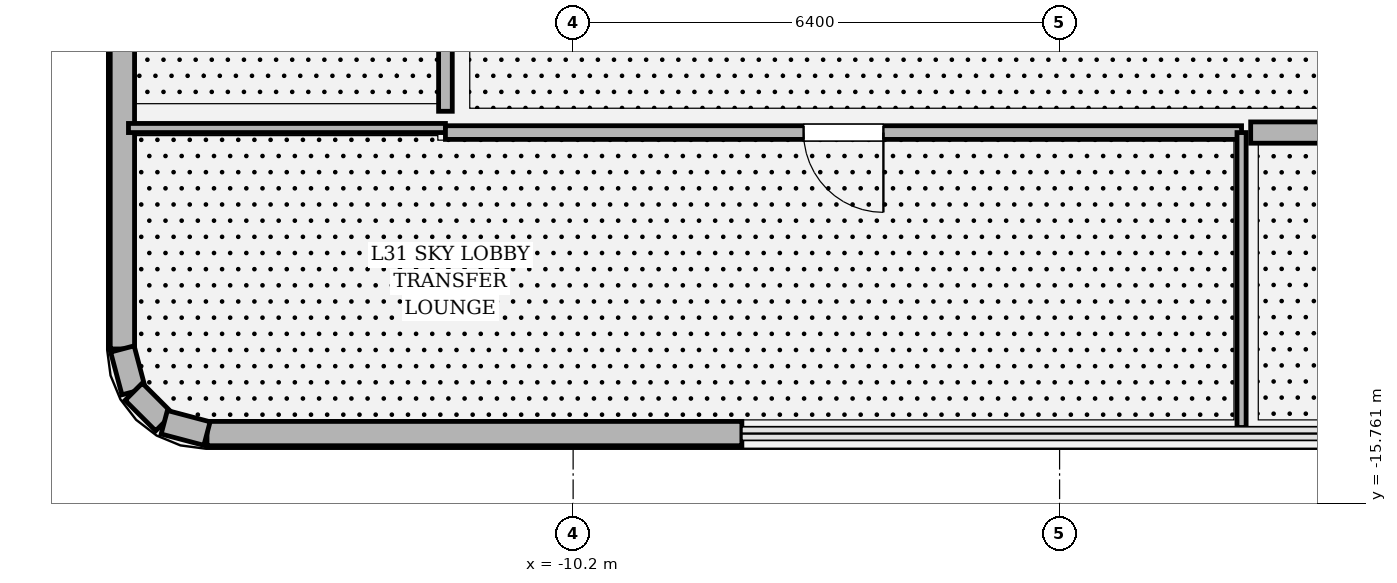
"""IFC4 building model, lengths in metres.
Left out: names, types, materials, properties, quantities, classifications, styles, units other than length and angle.
Written with IfcOpenShell. Run it as: python <this file> out.ifc"""

import sys

from ifc_helpers import new_model, si_unit, direction, frame, frame_2d, origin, place, context, subcontext, project, spatial, rectangle, extrude, element, fill, save


model = new_model("IFC4")
c1 = context("Model", 3, precision=1e-05, world=origin(), true_north=direction((0.0, 1.0)))
c2 = subcontext(c1, "Body", "Model", "MODEL_VIEW")
j1 = project(units=[si_unit("LENGTHUNIT", "METRE"), si_unit("PLANEANGLEUNIT", "RADIAN")], contexts=[c1])
p1 = place(None, origin())
s1 = spatial("IfcSite", under=j1, at=p1, CompositionType="ELEMENT")
p2 = place(p1, origin())
s2 = spatial("IfcBuilding", under=s1, at=p2, CompositionType="ELEMENT")
p3 = place(p2, frame((0.0, 0.0, 135.0)))
s3 = spatial("IfcBuildingStorey", under=s2, at=p3, CompositionType="ELEMENT", Elevation=135.0)
for number, where, z_axis, x_axis in (
    (1, (-15.017, -14.84, 0.0), (0.0, 0.0, 1.0), (1.0, 0.0, 0.0)),
    (2, (-16.13, -6.69, 0.0), (0.0, 0.0, 1.0), (0.0, -1.0, 0.0)),
):
    element("IfcWall", number, at=place(p3, frame(where, z_axis=z_axis, x_axis=x_axis)), inside=s3, PredefinedType="SOLIDWALL", context=c2, shape_type="SweptSolid", body=[
        extrude(rectangle(XDim=7.037, YDim=0.32, at=frame_2d((3.519, 0.0))), origin(), (0.0, 0.0, 1.0), 3.194),
    ])
p4 = place(p3, frame((-16.13, -13.727, 0.0), z_axis=(0.0, 0.0, 1.0), x_axis=(0.255650250031, -0.966769336325, 0.0)))
e3 = element("IfcWall", 3, at=p4, inside=s3, PredefinedType="SOLIDWALL", context=c2, shape_type="SweptSolid", body=[
    extrude(rectangle(XDim=0.582, YDim=0.32, at=frame_2d((0.291, 0.0))), origin(), (0.0, 0.0, 1.0), 4.52),
])
p5 = place(p3, frame((-15.981, -14.289, 0.0), z_axis=(0.0, 0.0, 1.0), x_axis=(0.707106781187, -0.707106781187, 0.0)))
e4 = element("IfcWall", 4, at=p5, inside=s3, PredefinedType="SOLIDWALL", context=c2, shape_type="SweptSolid", body=[
    extrude(rectangle(XDim=0.569, YDim=0.32, at=frame_2d((0.284, 0.0))), origin(), (0.0, 0.0, 1.0), 4.52),
])
p6 = place(p3, frame((-15.579, -14.691, 0.0), z_axis=(0.0, 0.0, 1.0), x_axis=(0.966665515501, -0.256042537758, 0.0)))
e5 = element("IfcWall", 5, at=p6, inside=s3, PredefinedType="SOLIDWALL", context=c2, shape_type="SweptSolid", body=[
    extrude(rectangle(XDim=0.582, YDim=0.32, at=frame_2d((0.291, 0.0))), origin(), (0.0, 0.0, 1.0), 4.52),
])
p7 = place(p3, frame((-16.05, -10.82, 0.0), z_axis=(0.0, 0.0, 1.0), x_axis=(1.0, 0.0, 0.0)))
e6 = element("IfcWall", 6, at=p7, inside=s3, PredefinedType="PARTITIONING", context=c2, shape_type="SweptSolid", body=[
    extrude(rectangle(XDim=4.17, YDim=0.12, at=frame_2d((2.085, 0.0))), origin(), (0.0, 0.0, 1.0), 4.114),
])
p8 = place(p3, frame((-11.88, -10.88, 0.0), z_axis=(0.0, 0.0, 1.0), x_axis=(1.0, 0.0, 0.0)))
e7 = element("IfcWall", 7, at=p8, inside=s3, PredefinedType="PARTITIONING", context=c2, shape_type="SweptSolid", body=[
    extrude(rectangle(XDim=10.474, YDim=0.18, at=frame_2d((5.237, 0.0))), origin(), (0.0, 0.0, 1.0), 3.194),
])
p9 = place(p8, frame((4.712, 0.0, 0.0)))
e8 = element("IfcOpeningElement", 8, at=p9, cuts=e7, PredefinedType="OPENING", context=c2, shape_type="SweptSolid", body=[
    extrude(rectangle(XDim=1.05, YDim=2.2, at=frame_2d((0.525, 1.1))), frame((0.0, 0.1, 0.0), z_axis=(0.0, -1.0, 0.0), x_axis=(1.0, 0.0, 0.0)), (0.0, 0.0, 1.0), 0.2),
])
p10 = place(p3, frame((-1.406, -10.88, 0.0), z_axis=(0.0, 0.0, 1.0), x_axis=(0.0, -1.0, 0.0)))
e9 = element("IfcWall", 9, at=p10, inside=s3, PredefinedType="PARTITIONING", context=c2, shape_type="SweptSolid", body=[
    extrude(rectangle(XDim=3.88, YDim=0.12, at=frame_2d((1.94, 0.0))), origin(), (0.0, 0.0, 1.0), 4.52),
])
p11 = place(p3, frame((-1.286, -10.88, 0.0), z_axis=(0.0, 0.0, 1.0), x_axis=(1.0, 0.0, 0.0)))
e10 = element("IfcWall", 10, at=p11, inside=s3, PredefinedType="SOLIDWALL", context=c2, shape_type="SweptSolid", body=[
    extrude(rectangle(XDim=13.166, YDim=0.28, at=frame_2d((6.583, 0.0))), origin(), (0.0, 0.0, 1.0), 3.194),
])
p12 = place(p11, frame((5.733, 0.0, 0.0)))
e11 = element("IfcOpeningElement", 11, at=p12, cuts=e10, PredefinedType="OPENING", context=c2, shape_type="SweptSolid", body=[
    extrude(rectangle(XDim=1.7, YDim=2.3, at=frame_2d((0.85, 1.15))), frame((0.0, 0.15, 0.0), z_axis=(0.0, -1.0, 0.0), x_axis=(1.0, 0.0, 0.0)), (0.0, 0.0, 1.0), 0.3),
])
p13 = place(p3, frame((-11.88, -0.06, 0.0), z_axis=(0.0, 0.0, 1.0), x_axis=(0.0, -1.0, 0.0)))
e12 = element("IfcWall", 12, at=p13, inside=s3, PredefinedType="PARTITIONING", context=c2, shape_type="SweptSolid", body=[
    extrude(rectangle(XDim=10.54, YDim=0.18, at=frame_2d((5.27, 0.0))), origin(), (0.0, 0.0, 1.0), 3.194),
])
p14 = place(p13, frame((4.76, 0.0, 0.0)))
e13 = element("IfcOpeningElement", 13, at=p14, cuts=e12, PredefinedType="OPENING", context=c2, shape_type="SweptSolid", body=[
    extrude(rectangle(XDim=1.02, YDim=2.2, at=frame_2d((0.51, 1.1))), frame((0.0, 0.1, 0.0), z_axis=(0.0, -1.0, 0.0), x_axis=(1.0, 0.0, 0.0)), (0.0, 0.0, 1.0), 0.2),
])
p15 = place(p9, origin())
e14 = element("IfcDoor", 14, at=p15, inside=s3, OperationType="SINGLE_SWING_RIGHT", PredefinedType="DOOR", context=c2, shape_type="SweptSolid", body=[
    extrude(rectangle(XDim=1.05, YDim=2.2, at=frame_2d((0.525, 1.1))), frame((0.0, 0.025, 0.0), z_axis=(0.0, -1.0, 0.0), x_axis=(1.0, 0.0, 0.0)), (0.0, 0.0, 1.0), 0.05),
])
fill(e8, e14)
save(model, sys.argv[1])
